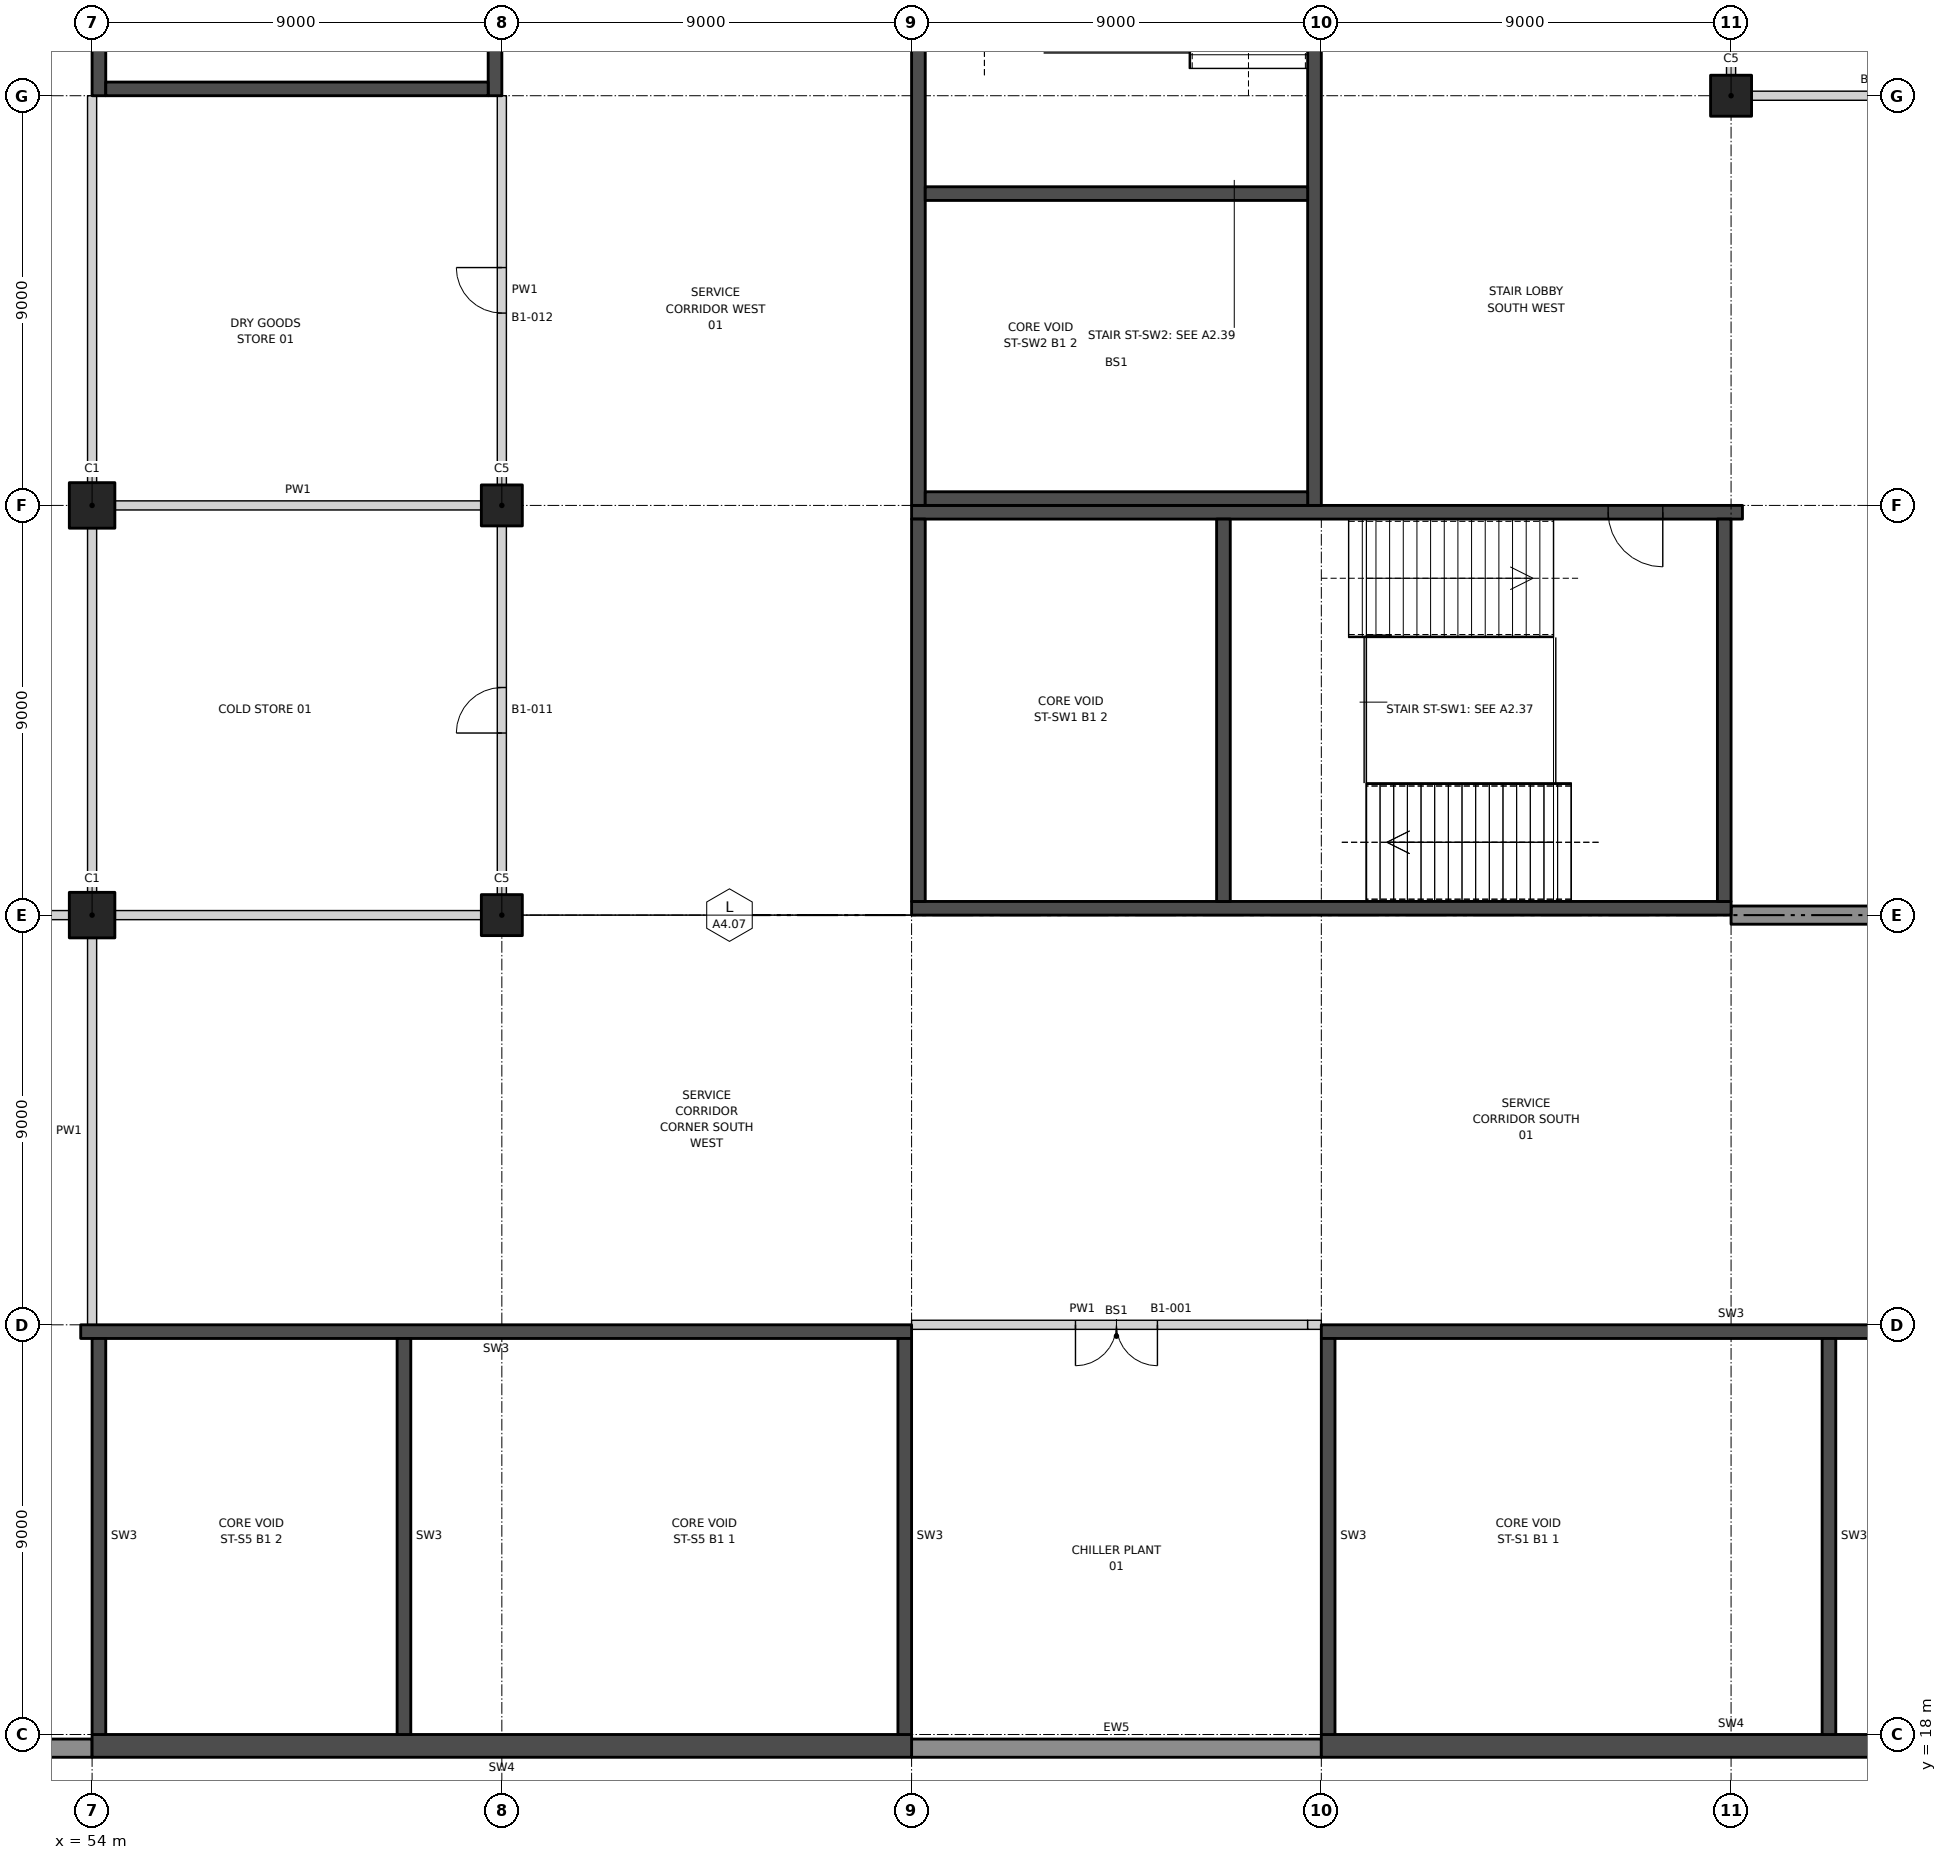
"""IFC4 building model, lengths in metres.
Left out: names, types, materials, properties, quantities, classifications, styles, units other than length and angle.
Written with IfcOpenShell. Run it as: python <this file> out.ifc"""

import sys

from ifc_helpers import new_model, si_unit, direction, frame, frame_2d, origin, origin_2d, place, context, subcontext, project, spatial, rectangle, extrude, element, fill, save


model = new_model("IFC4")
c1 = context("Model", 3, precision=1e-05, world=origin(), true_north=direction((0.0, 1.0)))
c2 = subcontext(c1, "Body", "Model", "MODEL_VIEW")
j1 = project(units=[si_unit("LENGTHUNIT", "METRE"), si_unit("PLANEANGLEUNIT", "RADIAN")], contexts=[c1])
p1 = place(None, origin())
s1 = spatial("IfcSite", under=j1, at=p1, CompositionType="ELEMENT")
p2 = place(p1, origin())
s2 = spatial("IfcBuilding", under=s1, at=p2, CompositionType="ELEMENT")
p3 = place(p2, frame((0.0, 0.0, -6.0)))
s3 = spatial("IfcBuildingStorey", under=s2, at=p3, CompositionType="ELEMENT", Elevation=-6.0)
for number, where, z_axis, x_axis in (
    (1, (54.0, 36.0, 0.0), (0.0, 0.0, 1.0), (1.0, 0.0, 0.0)),
    (2, (54.0, 45.0, 0.0), (0.0, 0.0, 1.0), (1.0, 0.0, 0.0)),
):
    element("IfcColumn", number, at=place(p3, frame(where, z_axis=z_axis, x_axis=x_axis)), inside=s3, PredefinedType="COLUMN", context=c2, shape_type="SweptSolid", body=[
        extrude(rectangle(XDim=1.0, YDim=1.0, at=origin_2d()), origin(), (0.0, 0.0, 1.0), 6.0),
    ])
for number, where, z_axis, x_axis in (
    (3, (63.0, 36.0, 0.0), (0.0, 0.0, 1.0), (1.0, 0.0, 0.0)),
    (4, (63.0, 45.0, 0.0), (0.0, 0.0, 1.0), (1.0, 0.0, 0.0)),
    (5, (90.0, 54.0, 0.0), (0.0, 0.0, 1.0), (1.0, 0.0, 0.0)),
):
    element("IfcColumn", number, at=place(p3, frame(where, z_axis=z_axis, x_axis=x_axis)), inside=s3, PredefinedType="COLUMN", context=c2, shape_type="SweptSolid", body=[
        extrude(rectangle(XDim=0.9, YDim=0.9, at=origin_2d()), origin(), (0.0, 0.0, 1.0), 6.0),
    ])
p4 = place(p3, frame((90.0, 36.0, 0.0), z_axis=(0.0, 0.0, 1.0), x_axis=(1.0, 0.0, 0.0)))
e6 = element("IfcWall", 6, at=p4, inside=s3, PredefinedType="SOLIDWALL", context=c2, shape_type="SweptSolid", body=[
    extrude(rectangle(XDim=39.8, YDim=0.4, at=frame_2d((19.9, 0.0))), origin(), (0.0, 0.0, 1.0), 6.0),
])
p5 = place(p3, frame((72.0, 27.0, 0.0), z_axis=(0.0, 0.0, 1.0), x_axis=(1.0, 0.0, 0.0)))
e7 = element("IfcWall", 7, at=p5, inside=s3, PredefinedType="PARTITIONING", context=c2, shape_type="SweptSolid", body=[
    extrude(rectangle(XDim=8.7, YDim=0.2, at=frame_2d((4.35, 0.0))), origin(), (0.0, 0.0, 1.0), 4.55),
])
p6 = place(p5, frame((3.6, 0.0, 0.0)))
e8 = element("IfcOpeningElement", 8, at=p6, cuts=e7, PredefinedType="OPENING", context=c2, shape_type="SweptSolid", body=[
    extrude(rectangle(XDim=1.8, YDim=2.1, at=frame_2d((0.9, 1.05))), frame((0.0, 0.11, 0.0), z_axis=(0.0, -1.0, 0.0), x_axis=(1.0, 0.0, 0.0)), (0.0, 0.0, 1.0), 0.22),
])
for number, where, z_axis, x_axis in (
    (9, (45.45, 36.0, 0.0), (0.0, 0.0, 1.0), (1.0, 0.0, 0.0)),
    (10, (54.5, 36.0, 0.0), (0.0, 0.0, 1.0), (1.0, 0.0, 0.0)),
    (11, (54.5, 45.0, 0.0), (0.0, 0.0, 1.0), (1.0, 0.0, 0.0)),
):
    element("IfcWall", number, at=place(p3, frame(where, z_axis=z_axis, x_axis=x_axis)), inside=s3, PredefinedType="PARTITIONING", context=c2, shape_type="SweptSolid", body=[
        extrude(rectangle(XDim=8.05, YDim=0.2, at=frame_2d((4.025, 0.0))), origin(), (0.0, 0.0, 1.0), 4.65),
    ])
p7 = place(p3, frame((90.45, 54.0, 0.0), z_axis=(0.0, 0.0, 1.0), x_axis=(1.0, 0.0, 0.0)))
e12 = element("IfcWall", 12, at=p7, inside=s3, PredefinedType="PARTITIONING", context=c2, shape_type="SweptSolid", body=[
    extrude(rectangle(XDim=8.1, YDim=0.2, at=frame_2d((4.05, 0.0))), origin(), (0.0, 0.0, 1.0), 4.65),
])
p8 = place(p7, frame((3.45, 0.0, 0.0)))
e13 = element("IfcOpeningElement", 13, at=p8, cuts=e12, PredefinedType="OPENING", context=c2, shape_type="SweptSolid", body=[
    extrude(rectangle(XDim=1.2, YDim=2.1, at=frame_2d((0.6, 1.05))), frame((0.0, 0.11, 0.0), z_axis=(0.0, -1.0, 0.0), x_axis=(1.0, 0.0, 0.0)), (0.0, 0.0, 1.0), 0.22),
])
p9 = place(p3, frame((54.0, 27.0, 0.0), z_axis=(0.0, 0.0, 1.0), x_axis=(0.0, 1.0, 0.0)))
e14 = element("IfcWall", 14, at=p9, inside=s3, PredefinedType="PARTITIONING", context=c2, shape_type="SweptSolid", body=[
    extrude(rectangle(XDim=8.5, YDim=0.2, at=frame_2d((4.25, 0.0))), origin(), (0.0, 0.0, 1.0), 4.65),
])
p10 = place(p3, frame((54.0, 36.5, 0.0), z_axis=(0.0, 0.0, 1.0), x_axis=(0.0, 1.0, 0.0)))
e15 = element("IfcWall", 15, at=p10, inside=s3, PredefinedType="PARTITIONING", context=c2, shape_type="SweptSolid", body=[
    extrude(rectangle(XDim=8.0, YDim=0.2, at=frame_2d((4.0, 0.0))), origin(), (0.0, 0.0, 1.0), 4.65),
])
p11 = place(p3, frame((54.0, 45.5, 0.0), z_axis=(0.0, 0.0, 1.0), x_axis=(0.0, 1.0, 0.0)))
e16 = element("IfcWall", 16, at=p11, inside=s3, PredefinedType="PARTITIONING", context=c2, shape_type="SweptSolid", body=[
    extrude(rectangle(XDim=8.5, YDim=0.2, at=frame_2d((4.25, 0.0))), origin(), (0.0, 0.0, 1.0), 4.65),
])
p12 = place(p3, frame((63.0, 36.45, 0.0), z_axis=(0.0, 0.0, 1.0), x_axis=(0.0, 1.0, 0.0)))
e17 = element("IfcWall", 17, at=p12, inside=s3, PredefinedType="PARTITIONING", context=c2, shape_type="SweptSolid", body=[
    extrude(rectangle(XDim=8.1, YDim=0.2, at=frame_2d((4.05, 0.0))), origin(), (0.0, 0.0, 1.0), 4.65),
])
p13 = place(p12, frame((3.55, 0.0, 0.0)))
e18 = element("IfcOpeningElement", 18, at=p13, cuts=e17, PredefinedType="OPENING", context=c2, shape_type="SweptSolid", body=[
    extrude(rectangle(XDim=1.0, YDim=2.1, at=frame_2d((0.5, 1.05))), frame((0.0, 0.11, 0.0), z_axis=(0.0, -1.0, 0.0), x_axis=(1.0, 0.0, 0.0)), (0.0, 0.0, 1.0), 0.22),
])
p14 = place(p3, frame((63.0, 45.45, 0.0), z_axis=(0.0, 0.0, 1.0), x_axis=(0.0, 1.0, 0.0)))
e19 = element("IfcWall", 19, at=p14, inside=s3, PredefinedType="PARTITIONING", context=c2, shape_type="SweptSolid", body=[
    extrude(rectangle(XDim=8.55, YDim=0.2, at=frame_2d((4.275, 0.0))), origin(), (0.0, 0.0, 1.0), 4.55),
])
p15 = place(p14, frame((3.775, 0.0, 0.0)))
e20 = element("IfcOpeningElement", 20, at=p15, cuts=e19, PredefinedType="OPENING", context=c2, shape_type="SweptSolid", body=[
    extrude(rectangle(XDim=1.0, YDim=2.1, at=frame_2d((0.5, 1.05))), frame((0.0, 0.11, 0.0), z_axis=(0.0, -1.0, 0.0), x_axis=(1.0, 0.0, 0.0)), (0.0, 0.0, 1.0), 0.22),
])
p16 = place(p3, frame((90.0, 54.45, 0.0), z_axis=(0.0, 0.0, 1.0), x_axis=(0.0, 1.0, 0.0)))
e21 = element("IfcWall", 21, at=p16, inside=s3, PredefinedType="PARTITIONING", context=c2, shape_type="SweptSolid", body=[
    extrude(rectangle(XDim=5.55, YDim=0.2, at=frame_2d((2.775, 0.0))), origin(), (0.0, 0.0, 1.0), 4.85),
])
p17 = place(p3, frame((45.45, 17.7, 0.0), z_axis=(0.0, 0.0, 1.0), x_axis=(1.0, 0.0, 0.0)))
e22 = element("IfcWall", 22, at=p17, inside=s3, PredefinedType="SOLIDWALL", context=c2, shape_type="SweptSolid", body=[
    extrude(rectangle(XDim=8.55, YDim=0.4, at=frame_2d((4.275, 0.0))), origin(), (0.0, 0.0, 1.0), 6.0),
])
p18 = place(p3, frame((72.0, 17.7, 0.0), z_axis=(0.0, 0.0, 1.0), x_axis=(1.0, 0.0, 0.0)))
e23 = element("IfcWall", 23, at=p18, inside=s3, PredefinedType="SOLIDWALL", context=c2, shape_type="SweptSolid", body=[
    extrude(rectangle(XDim=9.0, YDim=0.4, at=frame_2d((4.5, 0.0))), origin(), (0.0, 0.0, 1.0), 6.0),
])
p19 = place(p3, frame((81.0, 26.85, 0.0), z_axis=(0.0, 0.0, 1.0), x_axis=(1.0, 0.0, 0.0)))
e24 = element("IfcWall", 24, at=p19, inside=s3, PredefinedType="SHEAR", context=c2, shape_type="SweptSolid", body=[
    extrude(rectangle(XDim=18.0, YDim=0.3, at=frame_2d((9.0, 0.0))), origin(), (0.0, 0.0, 1.0), 6.0),
])
p20 = place(p3, frame((81.0, 17.75, 0.0), z_axis=(0.0, 0.0, 1.0), x_axis=(1.0, 0.0, 0.0)))
e25 = element("IfcWall", 25, at=p20, inside=s3, PredefinedType="SHEAR", context=c2, shape_type="SweptSolid", body=[
    extrude(rectangle(XDim=18.0, YDim=0.5, at=frame_2d((9.0, 0.0))), origin(), (0.0, 0.0, 1.0), 6.0),
])
for number, where, z_axis, x_axis in (
    (26, (81.15, 26.7, 0.0), (0.0, 0.0, 1.0), (0.0, -1.0, 0.0)),
    (27, (92.15, 26.7, 0.0), (0.0, 0.0, 1.0), (0.0, -1.0, 0.0)),
):
    element("IfcWall", number, at=place(p3, frame(where, z_axis=z_axis, x_axis=x_axis)), inside=s3, PredefinedType="SHEAR", context=c2, shape_type="SweptSolid", body=[
        extrude(rectangle(XDim=8.7, YDim=0.3, at=frame_2d((4.35, 0.0))), origin(), (0.0, 0.0, 1.0), 6.0),
    ])
p21 = place(p3, frame((72.0, 26.85, 0.0), z_axis=(0.0, 0.0, 1.0), x_axis=(-1.0, 0.0, 0.0)))
e28 = element("IfcWall", 28, at=p21, inside=s3, PredefinedType="SHEAR", context=c2, shape_type="SweptSolid", body=[
    extrude(rectangle(XDim=18.25, YDim=0.3, at=frame_2d((9.125, 0.0))), origin(), (0.0, 0.0, 1.0), 6.0),
])
p22 = place(p3, frame((72.0, 17.75, 0.0), z_axis=(0.0, 0.0, 1.0), x_axis=(-1.0, 0.0, 0.0)))
e29 = element("IfcWall", 29, at=p22, inside=s3, PredefinedType="SHEAR", context=c2, shape_type="SweptSolid", body=[
    extrude(rectangle(XDim=18.0, YDim=0.5, at=frame_2d((9.0, 0.0))), origin(), (0.0, 0.0, 1.0), 6.0),
])
for number, where, z_axis, x_axis in (
    (30, (71.85, 26.7, 0.0), (0.0, 0.0, 1.0), (0.0, -1.0, 0.0)),
    (31, (54.15, 26.7, 0.0), (0.0, 0.0, 1.0), (0.0, -1.0, 0.0)),
    (32, (60.85, 26.7, 0.0), (0.0, 0.0, 1.0), (0.0, -1.0, 0.0)),
):
    element("IfcWall", number, at=place(p3, frame(where, z_axis=z_axis, x_axis=x_axis)), inside=s3, PredefinedType="SHEAR", context=c2, shape_type="SweptSolid", body=[
        extrude(rectangle(XDim=8.7, YDim=0.3, at=frame_2d((4.35, 0.0))), origin(), (0.0, 0.0, 1.0), 6.0),
    ])
p23 = place(p3, frame((62.85, 54.0, 0.0), z_axis=(0.0, 0.0, 1.0), x_axis=(0.0, 1.0, 0.0)))
e33 = element("IfcWall", 33, at=p23, inside=s3, PredefinedType="SHEAR", context=c2, shape_type="SweptSolid", body=[
    extrude(rectangle(XDim=18.0, YDim=0.3, at=frame_2d((9.0, 0.0))), origin(), (0.0, 0.0, 1.0), 6.0),
])
p24 = place(p23, frame((8.6, 0.0, 0.0)))
e34 = element("IfcOpeningElement", 34, at=p24, cuts=e33, PredefinedType="OPENING", context=c2, shape_type="SweptSolid", body=[
    extrude(rectangle(XDim=1.2, YDim=2.1, at=frame_2d((0.6, 1.05))), frame((0.0, 0.16, 0.0), z_axis=(0.0, -1.0, 0.0), x_axis=(1.0, 0.0, 0.0)), (0.0, 0.0, 1.0), 0.32),
])
p25 = place(p3, frame((54.15, 54.0, 0.0), z_axis=(0.0, 0.0, 1.0), x_axis=(0.0, 1.0, 0.0)))
e35 = element("IfcWall", 35, at=p25, inside=s3, PredefinedType="SHEAR", context=c2, shape_type="SweptSolid", body=[
    extrude(rectangle(XDim=18.0, YDim=0.3, at=frame_2d((9.0, 0.0))), origin(), (0.0, 0.0, 1.0), 6.0),
])
p26 = place(p25, frame((8.6, 0.0, 0.0)))
e36 = element("IfcOpeningElement", 36, at=p26, cuts=e35, PredefinedType="OPENING", context=c2, shape_type="SweptSolid", body=[
    extrude(rectangle(XDim=1.2, YDim=2.1, at=frame_2d((0.6, 1.05))), frame((0.0, 0.16, 0.0), z_axis=(0.0, -1.0, 0.0), x_axis=(1.0, 0.0, 0.0)), (0.0, 0.0, 1.0), 0.32),
])
p27 = place(p3, frame((62.7, 54.15, 0.0), z_axis=(0.0, 0.0, 1.0), x_axis=(-1.0, 0.0, 0.0)))
e37 = element("IfcWall", 37, at=p27, inside=s3, PredefinedType="SHEAR", context=c2, shape_type="SweptSolid", body=[
    extrude(rectangle(XDim=8.4, YDim=0.3, at=frame_2d((4.2, 0.0))), origin(), (0.0, 0.0, 1.0), 6.0),
])
p28 = place(p3, frame((90.25, 44.85, 0.0), z_axis=(0.0, 0.0, 1.0), x_axis=(-1.0, 0.0, 0.0)))
e38 = element("IfcWall", 38, at=p28, inside=s3, PredefinedType="SHEAR", context=c2, shape_type="SweptSolid", body=[
    extrude(rectangle(XDim=18.25, YDim=0.3, at=frame_2d((9.125, 0.0))), origin(), (0.0, 0.0, 1.0), 6.0),
])
p29 = place(p28, frame((1.75, 0.0, 0.0)))
e39 = element("IfcOpeningElement", 39, at=p29, cuts=e38, PredefinedType="OPENING", context=c2, shape_type="SweptSolid", body=[
    extrude(rectangle(XDim=1.2, YDim=2.1, at=frame_2d((0.6, 1.05))), frame((0.0, 0.16, 0.0), z_axis=(0.0, -1.0, 0.0), x_axis=(1.0, 0.0, 0.0)), (0.0, 0.0, 1.0), 0.32),
])
p30 = place(p3, frame((90.0, 36.15, 0.0), z_axis=(0.0, 0.0, 1.0), x_axis=(-1.0, 0.0, 0.0)))
e40 = element("IfcWall", 40, at=p30, inside=s3, PredefinedType="SHEAR", context=c2, shape_type="SweptSolid", body=[
    extrude(rectangle(XDim=18.0, YDim=0.3, at=frame_2d((9.0, 0.0))), origin(), (0.0, 0.0, 1.0), 6.0),
])
for number, where, z_axis, x_axis in (
    (41, (89.85, 44.7, 0.0), (0.0, 0.0, 1.0), (0.0, -1.0, 0.0)),
    (42, (72.15, 44.7, 0.0), (0.0, 0.0, 1.0), (0.0, -1.0, 0.0)),
    (43, (78.85, 44.7, 0.0), (0.0, 0.0, 1.0), (0.0, -1.0, 0.0)),
):
    element("IfcWall", number, at=place(p3, frame(where, z_axis=z_axis, x_axis=x_axis)), inside=s3, PredefinedType="SHEAR", context=c2, shape_type="SweptSolid", body=[
        extrude(rectangle(XDim=8.4, YDim=0.3, at=frame_2d((4.2, 0.0))), origin(), (0.0, 0.0, 1.0), 6.0),
    ])
p31 = place(p3, frame((80.85, 63.0, 0.0), z_axis=(0.0, 0.0, 1.0), x_axis=(0.0, -1.0, 0.0)))
e44 = element("IfcWall", 44, at=p31, inside=s3, PredefinedType="SHEAR", context=c2, shape_type="SweptSolid", body=[
    extrude(rectangle(XDim=18.0, YDim=0.3, at=frame_2d((9.0, 0.0))), origin(), (0.0, 0.0, 1.0), 6.0),
])
p32 = place(p31, frame((1.5, 0.0, 0.0)))
e45 = element("IfcOpeningElement", 45, at=p32, cuts=e44, PredefinedType="OPENING", context=c2, shape_type="SweptSolid", body=[
    extrude(rectangle(XDim=1.2, YDim=2.1, at=frame_2d((0.6, 1.05))), frame((0.0, 0.16, 0.0), z_axis=(0.0, -1.0, 0.0), x_axis=(1.0, 0.0, 0.0)), (0.0, 0.0, 1.0), 0.32),
])
p33 = place(p3, frame((72.15, 63.0, 0.0), z_axis=(0.0, 0.0, 1.0), x_axis=(0.0, -1.0, 0.0)))
e46 = element("IfcWall", 46, at=p33, inside=s3, PredefinedType="SHEAR", context=c2, shape_type="SweptSolid", body=[
    extrude(rectangle(XDim=18.0, YDim=0.3, at=frame_2d((9.0, 0.0))), origin(), (0.0, 0.0, 1.0), 6.0),
])
for number, where, z_axis, x_axis in (
    (47, (80.7, 45.15, 0.0), (0.0, 0.0, 1.0), (-1.0, 0.0, 0.0)),
    (48, (80.7, 51.85, 0.0), (0.0, 0.0, 1.0), (-1.0, 0.0, 0.0)),
):
    element("IfcWall", number, at=place(p3, frame(where, z_axis=z_axis, x_axis=x_axis)), inside=s3, PredefinedType="SHEAR", context=c2, shape_type="SweptSolid", body=[
        extrude(rectangle(XDim=8.4, YDim=0.3, at=frame_2d((4.2, 0.0))), origin(), (0.0, 0.0, 1.0), 6.0),
    ])
p34 = place(p3, frame((80.7, 27.0, 0.0), z_axis=(0.0, 0.0, 1.0), x_axis=(1.0, 0.0, 0.0)))
e49 = element("IfcWall", 49, at=p34, inside=s3, PredefinedType="PARTITIONING", context=c2, shape_type="SweptSolid", body=[
    extrude(rectangle(XDim=0.3, YDim=0.2, at=frame_2d((0.15, 0.0))), origin(), (0.0, 0.0, 1.0), 6.0),
])
p35 = place(p6, frame((1.8, 0.0, 0.0), z_axis=(0.0, 0.0, 1.0), x_axis=(-1.0, 0.0, 0.0)))
e50 = element("IfcDoor", 50, at=p35, inside=s3, OperationType="DOUBLE_DOOR_DOUBLE_SWING", PredefinedType="DOOR", context=c2, shape_type="SweptSolid", body=[
    extrude(rectangle(XDim=1.8, YDim=2.1, at=frame_2d((0.9, 1.05))), frame((0.0, 0.025, 0.0), z_axis=(0.0, -1.0, 0.0), x_axis=(1.0, 0.0, 0.0)), (0.0, 0.0, 1.0), 0.05),
])
fill(e8, e50)
p36 = place(p13, origin())
e51 = element("IfcDoor", 51, at=p36, inside=s3, OperationType="SINGLE_SWING_LEFT", PredefinedType="DOOR", context=c2, shape_type="SweptSolid", body=[
    extrude(rectangle(XDim=1.0, YDim=2.1, at=frame_2d((0.5, 1.05))), frame((0.0, 0.025, 0.0), z_axis=(0.0, -1.0, 0.0), x_axis=(1.0, 0.0, 0.0)), (0.0, 0.0, 1.0), 0.05),
])
fill(e18, e51)
p37 = place(p15, origin())
e52 = element("IfcDoor", 52, at=p37, inside=s3, OperationType="SINGLE_SWING_RIGHT", PredefinedType="DOOR", context=c2, shape_type="SweptSolid", body=[
    extrude(rectangle(XDim=1.0, YDim=2.1, at=frame_2d((0.5, 1.05))), frame((0.0, 0.025, 0.0), z_axis=(0.0, -1.0, 0.0), x_axis=(1.0, 0.0, 0.0)), (0.0, 0.0, 1.0), 0.05),
])
fill(e20, e52)
p38 = place(p29, origin())
e53 = element("IfcDoor", 53, at=p38, inside=s3, OperationType="SINGLE_SWING_LEFT", PredefinedType="DOOR", context=c2, shape_type="SweptSolid", body=[
    extrude(rectangle(XDim=1.2, YDim=2.1, at=frame_2d((0.6, 1.05))), frame((0.0, 0.025, 0.0), z_axis=(0.0, -1.0, 0.0), x_axis=(1.0, 0.0, 0.0)), (0.0, 0.0, 1.0), 0.05),
])
fill(e39, e53)
save(model, sys.argv[1])
